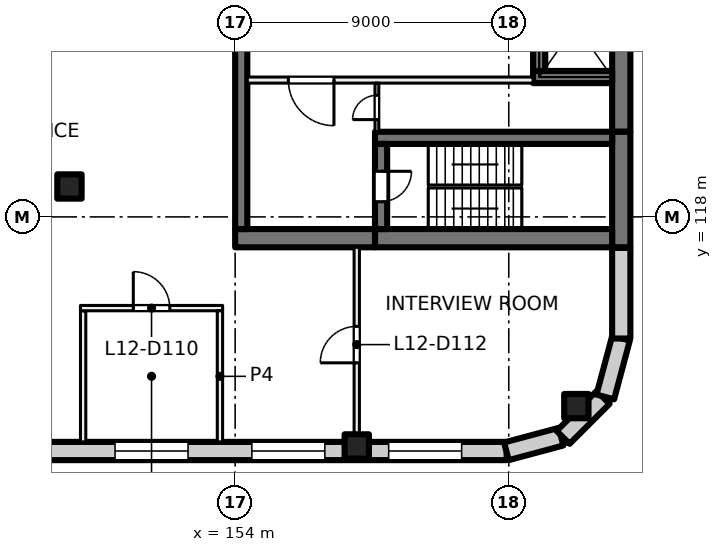
"""IFC4 building model, lengths in metres.
Left out: names, types, materials, properties, quantities, classifications, styles, units other than length and angle.
Written with IfcOpenShell. Run it as: python <this file> out.ifc"""

import sys

from ifc_helpers import new_model, si_unit, direction, frame, frame_2d, origin, origin_2d, place, context, subcontext, project, spatial, rectangle, extrude, element, fill, save


model = new_model("IFC4")
c1 = context("Model", 3, precision=1e-05, world=origin(), true_north=direction((0.0, 1.0)))
c2 = subcontext(c1, "Body", "Model", "MODEL_VIEW")
j1 = project(units=[si_unit("LENGTHUNIT", "METRE"), si_unit("PLANEANGLEUNIT", "RADIAN")], contexts=[c1])
p1 = place(None, origin())
s1 = spatial("IfcSite", under=j1, at=p1, CompositionType="ELEMENT")
p2 = place(p1, origin())
s2 = spatial("IfcBuilding", under=s1, at=p2, CompositionType="ELEMENT")
p3 = place(p2, frame((0.0, 0.0, 55.5)))
s3 = spatial("IfcBuildingStorey", under=s2, at=p3, CompositionType="ELEMENT", Elevation=55.5)
for number, where, z_axis, x_axis in (
    (1, (148.55, 119.0, 0.0), (0.0, 0.0, 1.0), (1.0, 0.0, 0.0)),
    (2, (165.223, 111.777, 0.0), (0.0, 0.0, 1.0), (1.0, 0.0, 0.0)),
    (3, (158.0, 110.45, 0.0), (0.0, 0.0, 1.0), (1.0, 0.0, 0.0)),
):
    element("IfcColumn", number, at=place(p3, frame(where, z_axis=z_axis, x_axis=x_axis)), inside=s3, PredefinedType="COLUMN", context=c2, shape_type="SweptSolid", body=[
        extrude(rectangle(XDim=0.8, YDim=0.8, at=origin_2d()), origin(), (0.0, 0.0, 1.0), 4.0),
    ])
p4 = place(p3, frame((166.7, 135.2, 0.0), z_axis=(0.0, 0.0, 1.0), x_axis=(0.0, -1.0, 0.0)))
e4 = element("IfcWall", 4, at=p4, inside=s3, PredefinedType="SHEAR", context=c2, shape_type="SweptSolid", body=[
    extrude(rectangle(XDim=14.4, YDim=0.6, at=frame_2d((7.2, 0.0))), origin(), (0.0, 0.0, 1.0), 4.0),
])
p5 = place(p3, frame((166.7, 120.8, 0.0), z_axis=(0.0, 0.0, 1.0), x_axis=(0.0, -1.0, 0.0)))
e5 = element("IfcWall", 5, at=p5, inside=s3, PredefinedType="SHEAR", context=c2, shape_type="SweptSolid", body=[
    extrude(rectangle(XDim=3.8, YDim=0.6, at=frame_2d((1.9, 0.0))), origin(), (0.0, 0.0, 1.0), 4.0),
])
p6 = place(p3, frame((166.4, 117.3, 0.0), z_axis=(0.0, 0.0, 1.0), x_axis=(-1.0, 0.0, 0.0)))
e6 = element("IfcWall", 6, at=p6, inside=s3, PredefinedType="SHEAR", context=c2, shape_type="SweptSolid", body=[
    extrude(rectangle(XDim=7.8, YDim=0.6, at=frame_2d((3.9, 0.0))), origin(), (0.0, 0.0, 1.0), 4.0),
])
p7 = place(p3, frame((158.6, 117.3, 0.0), z_axis=(0.0, 0.0, 1.0), x_axis=(-1.0, 0.0, 0.0)))
e7 = element("IfcWall", 7, at=p7, inside=s3, PredefinedType="SHEAR", context=c2, shape_type="SweptSolid", body=[
    extrude(rectangle(XDim=4.6, YDim=0.6, at=frame_2d((2.3, 0.0))), origin(), (0.0, 0.0, 1.0), 4.0),
])
p8 = place(p3, frame((166.4, 120.6, 0.0), z_axis=(0.0, 0.0, 1.0), x_axis=(-1.0, 0.0, 0.0)))
e8 = element("IfcWall", 8, at=p8, inside=s3, PredefinedType="SHEAR", context=c2, shape_type="SweptSolid", body=[
    extrude(rectangle(XDim=7.8, YDim=0.4, at=frame_2d((3.9, 0.0))), origin(), (0.0, 0.0, 1.0), 4.0),
])
p9 = place(p3, frame((158.8, 120.4, 0.0), z_axis=(0.0, 0.0, 1.0), x_axis=(0.0, -1.0, 0.0)))
e9 = element("IfcWall", 9, at=p9, inside=s3, PredefinedType="SHEAR", context=c2, shape_type="SweptSolid", body=[
    extrude(rectangle(XDim=2.8, YDim=0.4, at=frame_2d((1.4, 0.0))), origin(), (0.0, 0.0, 1.0), 4.0),
])
p10 = place(p9, frame((0.9, 0.0, 0.0)))
e10 = element("IfcOpeningElement", 10, at=p10, cuts=e9, PredefinedType="OPENING", context=c2, shape_type="SweptSolid", body=[
    extrude(rectangle(XDim=1.0, YDim=2.1, at=frame_2d((0.5, 1.05))), frame((0.0, 0.21, 0.0), z_axis=(0.0, -1.0, 0.0), x_axis=(1.0, 0.0, 0.0)), (0.0, 0.0, 1.0), 0.42),
])
p11 = place(p3, frame((166.4, 122.6, 0.0), z_axis=(0.0, 0.0, 1.0), x_axis=(-1.0, 0.0, 0.0)))
e11 = element("IfcWall", 11, at=p11, inside=s3, PredefinedType="SHEAR", context=c2, shape_type="SweptSolid", body=[
    extrude(rectangle(XDim=2.6, YDim=0.4, at=frame_2d((1.3, 0.0))), origin(), (0.0, 0.0, 1.0), 4.0),
])
p12 = place(p3, frame((164.0, 125.8, 0.0), z_axis=(0.0, 0.0, 1.0), x_axis=(0.0, -1.0, 0.0)))
e12 = element("IfcWall", 12, at=p12, inside=s3, PredefinedType="SHEAR", context=c2, shape_type="SweptSolid", body=[
    extrude(rectangle(XDim=3.0, YDim=0.4, at=frame_2d((1.5, 0.0))), origin(), (0.0, 0.0, 1.0), 4.0),
])
p13 = place(p3, frame((154.2, 126.2, 0.0), z_axis=(0.0, 0.0, 1.0), x_axis=(0.0, -1.0, 0.0)))
e13 = element("IfcWall", 13, at=p13, inside=s3, PredefinedType="SHEAR", context=c2, shape_type="SweptSolid", body=[
    extrude(rectangle(XDim=8.6, YDim=0.4, at=frame_2d((4.3, 0.0))), origin(), (0.0, 0.0, 1.0), 4.0),
])
p14 = place(p3, frame((162.93, 110.3, 0.0), z_axis=(0.0, 0.0, 1.0), x_axis=(-1.0, 0.0, 0.0)))
e14 = element("IfcWall", 14, at=p14, inside=s3, PredefinedType="SOLIDWALL", context=c2, shape_type="SweptSolid", body=[
    extrude(rectangle(XDim=31.93, YDim=0.6, at=frame_2d((15.965, 0.0))), origin(), (0.0, 0.0, 1.0), 3.625),
])
p15 = place(p14, frame((1.48, 0.0, 0.9)))
e15 = element("IfcOpeningElement", 15, at=p15, cuts=e14, PredefinedType="OPENING", context=c2, shape_type="SweptSolid", body=[
    extrude(rectangle(XDim=2.4, YDim=2.4, at=frame_2d((1.2, 1.2))), frame((0.0, 0.31, 0.0), z_axis=(0.0, -1.0, 0.0), x_axis=(1.0, 0.0, 0.0)), (0.0, 0.0, 1.0), 0.62),
])
p16 = place(p14, frame((5.98, 0.0, 0.9)))
e16 = element("IfcOpeningElement", 16, at=p16, cuts=e14, PredefinedType="OPENING", context=c2, shape_type="SweptSolid", body=[
    extrude(rectangle(XDim=2.4, YDim=2.4, at=frame_2d((1.2, 1.2))), frame((0.0, 0.31, 0.0), z_axis=(0.0, -1.0, 0.0), x_axis=(1.0, 0.0, 0.0)), (0.0, 0.0, 1.0), 0.62),
])
p17 = place(p14, frame((10.48, 0.0, 0.9)))
e17 = element("IfcOpeningElement", 17, at=p17, cuts=e14, PredefinedType="OPENING", context=c2, shape_type="SweptSolid", body=[
    extrude(rectangle(XDim=2.4, YDim=2.4, at=frame_2d((1.2, 1.2))), frame((0.0, 0.31, 0.0), z_axis=(0.0, -1.0, 0.0), x_axis=(1.0, 0.0, 0.0)), (0.0, 0.0, 1.0), 0.62),
])
p18 = place(p14, frame((14.98, 0.0, 0.9)))
e18 = element("IfcOpeningElement", 18, at=p18, cuts=e14, PredefinedType="OPENING", context=c2, shape_type="SweptSolid", body=[
    extrude(rectangle(XDim=2.4, YDim=2.4, at=frame_2d((1.2, 1.2))), frame((0.0, 0.31, 0.0), z_axis=(0.0, -1.0, 0.0), x_axis=(1.0, 0.0, 0.0)), (0.0, 0.0, 1.0), 0.62),
])
p19 = place(p14, frame((19.48, 0.0, 0.9)))
e19 = element("IfcOpeningElement", 19, at=p19, cuts=e14, PredefinedType="OPENING", context=c2, shape_type="SweptSolid", body=[
    extrude(rectangle(XDim=2.4, YDim=2.4, at=frame_2d((1.2, 1.2))), frame((0.0, 0.31, 0.0), z_axis=(0.0, -1.0, 0.0), x_axis=(1.0, 0.0, 0.0)), (0.0, 0.0, 1.0), 0.62),
])
p20 = place(p14, frame((23.98, 0.0, 0.9)))
e20 = element("IfcOpeningElement", 20, at=p20, cuts=e14, PredefinedType="OPENING", context=c2, shape_type="SweptSolid", body=[
    extrude(rectangle(XDim=2.4, YDim=2.4, at=frame_2d((1.2, 1.2))), frame((0.0, 0.31, 0.0), z_axis=(0.0, -1.0, 0.0), x_axis=(1.0, 0.0, 0.0)), (0.0, 0.0, 1.0), 0.62),
])
p21 = place(p14, frame((28.48, 0.0, 0.9)))
e21 = element("IfcOpeningElement", 21, at=p21, cuts=e14, PredefinedType="OPENING", context=c2, shape_type="SweptSolid", body=[
    extrude(rectangle(XDim=2.4, YDim=2.4, at=frame_2d((1.2, 1.2))), frame((0.0, 0.31, 0.0), z_axis=(0.0, -1.0, 0.0), x_axis=(1.0, 0.0, 0.0)), (0.0, 0.0, 1.0), 0.62),
])
for number, where, z_axis, x_axis in (
    (22, (164.719, 110.771, 0.0), (0.0, 0.0, 1.0), (-0.966, -0.259, 0.0)),
    (23, (166.104, 112.064, 0.0), (0.0, 0.0, 1.0), (-0.707, -0.707, 0.0)),
):
    element("IfcWall", number, at=place(p3, frame(where, z_axis=z_axis, x_axis=x_axis)), inside=s3, PredefinedType="SOLIDWALL", context=c2, shape_type="SweptSolid", body=[
        extrude(rectangle(XDim=1.861, YDim=0.6, at=frame_2d((0.93, 0.0))), origin(), (0.0, 0.0, 1.0), 3.625),
    ])
p22 = place(p3, frame((166.692, 114.01, 0.0), z_axis=(0.0, 0.0, 1.0), x_axis=(-0.258839784042, -0.965920269068, 0.0)))
e24 = element("IfcWall", 24, at=p22, inside=s3, PredefinedType="SOLIDWALL", context=c2, shape_type="SweptSolid", body=[
    extrude(rectangle(XDim=2.0, YDim=0.6, at=frame_2d((1.0, 0.0))), origin(), (0.0, 0.0, 1.0), 3.625),
])
p23 = place(p3, frame((166.7, 116.98, 0.0), z_axis=(0.0, 0.0, 1.0), x_axis=(0.0, -1.0, 0.0)))
e25 = element("IfcWall", 25, at=p23, inside=s3, PredefinedType="SOLIDWALL", context=c2, shape_type="SweptSolid", body=[
    extrude(rectangle(XDim=2.98, YDim=0.6, at=frame_2d((1.49, 0.0))), origin(), (0.0, 0.0, 1.0), 3.625),
])
p24 = place(p3, frame((163.8, 122.5, 0.0), z_axis=(0.0, 0.0, 1.0), x_axis=(-1.0, 0.0, 0.0)))
e26 = element("IfcWall", 26, at=p24, inside=s3, PredefinedType="PARTITIONING", context=c2, shape_type="SweptSolid", body=[
    extrude(rectangle(XDim=9.4, YDim=0.2, at=frame_2d((4.7, 0.0))), origin(), (0.0, 0.0, 1.0), 3.625),
])
p25 = place(p24, frame((6.55, 0.0, 0.0)))
e27 = element("IfcOpeningElement", 27, at=p25, cuts=e26, PredefinedType="OPENING", context=c2, shape_type="SweptSolid", body=[
    extrude(rectangle(XDim=1.5, YDim=2.1, at=frame_2d((0.75, 1.05))), frame((0.0, 0.11, 0.0), z_axis=(0.0, -1.0, 0.0), x_axis=(1.0, 0.0, 0.0)), (0.0, 0.0, 1.0), 0.22),
])
p26 = place(p3, frame((158.663, 120.8, 0.0), z_axis=(0.0, 0.0, 1.0), x_axis=(0.0, 1.0, 0.0)))
e28 = element("IfcWall", 28, at=p26, inside=s3, PredefinedType="PARTITIONING", context=c2, shape_type="SweptSolid", body=[
    extrude(rectangle(XDim=1.6, YDim=0.125, at=frame_2d((0.8, 0.0))), origin(), (0.0, 0.0, 1.0), 3.625),
])
p27 = place(p26, frame((0.4, 0.0, 0.0)))
e29 = element("IfcOpeningElement", 29, at=p27, cuts=e28, PredefinedType="OPENING", context=c2, shape_type="SweptSolid", body=[
    extrude(rectangle(XDim=0.8, YDim=2.1, at=frame_2d((0.4, 1.05))), frame((0.0, 0.073, 0.0), z_axis=(0.0, -1.0, 0.0), x_axis=(1.0, 0.0, 0.0)), (0.0, 0.0, 1.0), 0.145),
])
p28 = place(p3, frame((149.0, 110.6, 0.0), z_axis=(0.0, 0.0, 1.0), x_axis=(0.0, 1.0, 0.0)))
e30 = element("IfcWall", 30, at=p28, inside=s3, PredefinedType="PARTITIONING", context=c2, shape_type="SweptSolid", body=[
    extrude(rectangle(XDim=4.312, YDim=0.175, at=frame_2d((2.156, 0.0))), origin(), (0.0, 0.0, 1.0), 3.625),
])
p29 = place(p3, frame((148.912, 115.0, 0.0), z_axis=(0.0, 0.0, 1.0), x_axis=(1.0, 0.0, 0.0)))
e31 = element("IfcWall", 31, at=p29, inside=s3, PredefinedType="PARTITIONING", context=c2, shape_type="SweptSolid", body=[
    extrude(rectangle(XDim=4.676, YDim=0.175, at=frame_2d((2.338, 0.0))), origin(), (0.0, 0.0, 1.0), 3.625),
])
p30 = place(p29, frame((1.738, 0.0, 0.0)))
e32 = element("IfcOpeningElement", 32, at=p30, cuts=e31, PredefinedType="OPENING", context=c2, shape_type="SweptSolid", body=[
    extrude(rectangle(XDim=1.2, YDim=2.1, at=frame_2d((0.6, 1.05))), frame((0.0, 0.097, 0.0), z_axis=(0.0, -1.0, 0.0), x_axis=(1.0, 0.0, 0.0)), (0.0, 0.0, 1.0), 0.195),
])
p31 = place(p3, frame((153.5, 114.912, 0.0), z_axis=(0.0, 0.0, 1.0), x_axis=(0.0, -1.0, 0.0)))
e33 = element("IfcWall", 33, at=p31, inside=s3, PredefinedType="PARTITIONING", context=c2, shape_type="SweptSolid", body=[
    extrude(rectangle(XDim=4.312, YDim=0.175, at=frame_2d((2.156, 0.0))), origin(), (0.0, 0.0, 1.0), 3.625),
])
p32 = place(p3, frame((158.0, 110.6, 0.0), z_axis=(0.0, 0.0, 1.0), x_axis=(0.0, 1.0, 0.0)))
e34 = element("IfcWall", 34, at=p32, inside=s3, PredefinedType="PARTITIONING", context=c2, shape_type="SweptSolid", body=[
    extrude(rectangle(XDim=6.4, YDim=0.175, at=frame_2d((3.2, 0.0))), origin(), (0.0, 0.0, 1.0), 3.625),
])
p33 = place(p32, frame((2.6, 0.0, 0.0)))
e35 = element("IfcOpeningElement", 35, at=p33, cuts=e34, PredefinedType="OPENING", context=c2, shape_type="SweptSolid", body=[
    extrude(rectangle(XDim=1.2, YDim=2.1, at=frame_2d((0.6, 1.05))), frame((0.0, 0.097, 0.0), z_axis=(0.0, -1.0, 0.0), x_axis=(1.0, 0.0, 0.0)), (0.0, 0.0, 1.0), 0.195),
])
p34 = place(p15, origin())
e36 = element("IfcWindow", 36, at=p34, inside=s3, PartitioningType="SINGLE_PANEL", PredefinedType="WINDOW", context=c2, shape_type="SweptSolid", body=[
    extrude(rectangle(XDim=2.4, YDim=2.4, at=frame_2d((1.2, 1.2))), frame((0.0, 0.03, 0.0), z_axis=(0.0, -1.0, 0.0), x_axis=(1.0, 0.0, 0.0)), (0.0, 0.0, 1.0), 0.06),
])
fill(e15, e36)
p35 = place(p16, origin())
e37 = element("IfcWindow", 37, at=p35, inside=s3, PartitioningType="SINGLE_PANEL", PredefinedType="WINDOW", context=c2, shape_type="SweptSolid", body=[
    extrude(rectangle(XDim=2.4, YDim=2.4, at=frame_2d((1.2, 1.2))), frame((0.0, 0.03, 0.0), z_axis=(0.0, -1.0, 0.0), x_axis=(1.0, 0.0, 0.0)), (0.0, 0.0, 1.0), 0.06),
])
fill(e16, e37)
p36 = place(p17, origin())
e38 = element("IfcWindow", 38, at=p36, inside=s3, PartitioningType="SINGLE_PANEL", PredefinedType="WINDOW", context=c2, shape_type="SweptSolid", body=[
    extrude(rectangle(XDim=2.4, YDim=2.4, at=frame_2d((1.2, 1.2))), frame((0.0, 0.03, 0.0), z_axis=(0.0, -1.0, 0.0), x_axis=(1.0, 0.0, 0.0)), (0.0, 0.0, 1.0), 0.06),
])
fill(e17, e38)
p37 = place(p25, origin())
e39 = element("IfcDoor", 39, at=p37, inside=s3, OperationType="DOUBLE_DOOR_SINGLE_SWING", PredefinedType="DOOR", context=c2, shape_type="SweptSolid", body=[
    extrude(rectangle(XDim=1.5, YDim=2.1, at=frame_2d((0.75, 1.05))), frame((0.0, 0.025, 0.0), z_axis=(0.0, -1.0, 0.0), x_axis=(1.0, 0.0, 0.0)), (0.0, 0.0, 1.0), 0.05),
])
fill(e27, e39)
p38 = place(p10, origin())
e40 = element("IfcDoor", 40, at=p38, inside=s3, OperationType="SINGLE_SWING_LEFT", PredefinedType="DOOR", context=c2, shape_type="SweptSolid", body=[
    extrude(rectangle(XDim=1.0, YDim=2.1, at=frame_2d((0.5, 1.05))), frame((0.0, 0.025, 0.0), z_axis=(0.0, -1.0, 0.0), x_axis=(1.0, 0.0, 0.0)), (0.0, 0.0, 1.0), 0.05),
])
fill(e10, e40)
p39 = place(p27, origin())
e41 = element("IfcDoor", 41, at=p39, inside=s3, OperationType="SINGLE_SWING_RIGHT", PredefinedType="DOOR", context=c2, shape_type="SweptSolid", body=[
    extrude(rectangle(XDim=0.8, YDim=2.1, at=frame_2d((0.4, 1.05))), frame((0.0, 0.025, 0.0), z_axis=(0.0, -1.0, 0.0), x_axis=(1.0, 0.0, 0.0)), (0.0, 0.0, 1.0), 0.05),
])
fill(e29, e41)
p40 = place(p30, origin())
e42 = element("IfcDoor", 42, at=p40, inside=s3, OperationType="DOUBLE_DOOR_SINGLE_SWING", PredefinedType="DOOR", context=c2, shape_type="SweptSolid", body=[
    extrude(rectangle(XDim=1.2, YDim=2.1, at=frame_2d((0.6, 1.05))), frame((0.0, 0.025, 0.0), z_axis=(0.0, -1.0, 0.0), x_axis=(1.0, 0.0, 0.0)), (0.0, 0.0, 1.0), 0.05),
])
fill(e32, e42)
p41 = place(p33, origin())
e43 = element("IfcDoor", 43, at=p41, inside=s3, OperationType="DOUBLE_DOOR_SINGLE_SWING", PredefinedType="DOOR", context=c2, shape_type="SweptSolid", body=[
    extrude(rectangle(XDim=1.2, YDim=2.1, at=frame_2d((0.6, 1.05))), frame((0.0, 0.025, 0.0), z_axis=(0.0, -1.0, 0.0), x_axis=(1.0, 0.0, 0.0)), (0.0, 0.0, 1.0), 0.05),
])
fill(e35, e43)
save(model, sys.argv[1])
